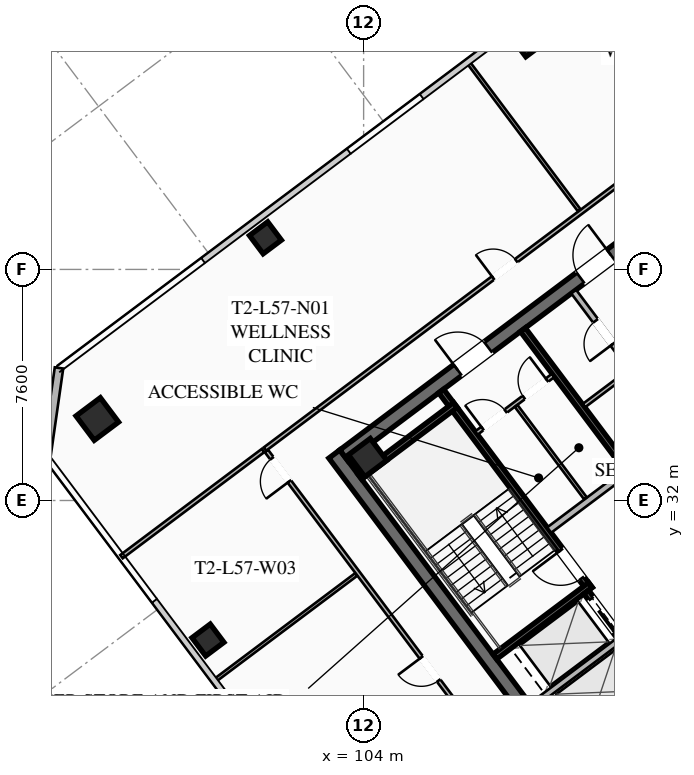
"""IFC4 building model, lengths in metres.
Left out: names, types, materials, properties, quantities, classifications, styles, units other than length and angle.
Written with IfcOpenShell. Run it as: python <this file> out.ifc"""

import sys

from ifc_helpers import new_model, si_unit, direction, frame, frame_2d, origin, origin_2d, place, context, subcontext, project, spatial, rectangle, hollow_rectangle, extrude, element, fill, save


model = new_model("IFC4")
c1 = context("Model", 3, precision=1e-05, world=origin(), true_north=direction((0.0, 1.0)))
c2 = subcontext(c1, "Body", "Model", "MODEL_VIEW")
j1 = project(units=[si_unit("LENGTHUNIT", "METRE"), si_unit("PLANEANGLEUNIT", "RADIAN")], contexts=[c1])
p1 = place(None, origin())
s1 = spatial("IfcSite", under=j1, at=p1, CompositionType="ELEMENT")
p2 = place(p1, origin())
s2 = spatial("IfcBuilding", under=s1, at=p2, CompositionType="ELEMENT")
p3 = place(p2, frame((0.0, 0.0, 211.3)))
s3 = spatial("IfcBuildingStorey", under=s2, at=p3, CompositionType="ELEMENT", Elevation=211.3)
p4 = place(p3, frame((112.396, 21.047, 0.0), z_axis=(0.0, 0.0, 1.0), x_axis=(-0.600005007985, 0.799996243986, 0.0)))
e1 = element("IfcWall", 1, at=p4, inside=s3, PredefinedType="SHEAR", context=c2, shape_type="SweptSolid", body=[
    extrude(rectangle(XDim=15.6, YDim=0.45, at=frame_2d((7.8, 0.0))), origin(), (0.0, 0.0, 1.0), 3.55),
])
p5 = place(p3, frame((103.351, 33.482, 0.0), z_axis=(0.0, 0.0, 1.0), x_axis=(0.8, 0.6, 0.0)))
e2 = element("IfcWall", 2, at=p5, inside=s3, PredefinedType="SHEAR", context=c2, shape_type="SweptSolid", body=[
    extrude(rectangle(XDim=15.26, YDim=0.45, at=frame_2d((7.63, 0.0))), origin(), (0.0, 0.0, 1.0), 3.55),
])
p6 = place(p5, frame((4.68, 0.0, 0.0)))
e3 = element("IfcOpeningElement", 3, at=p6, cuts=e2, PredefinedType="OPENING", context=c2, shape_type="SweptSolid", body=[
    extrude(rectangle(XDim=1.25, YDim=2.25, at=frame_2d((0.625, 1.125))), frame((0.0, 0.235, 0.0), z_axis=(0.0, -1.0, 0.0), x_axis=(1.0, 0.0, 0.0)), (0.0, 0.0, 1.0), 0.47),
])
p7 = place(p5, frame((9.73, 0.0, 0.0)))
e4 = element("IfcOpeningElement", 4, at=p7, cuts=e2, PredefinedType="OPENING", context=c2, shape_type="SweptSolid", body=[
    extrude(rectangle(XDim=1.25, YDim=2.25, at=frame_2d((0.625, 1.125))), frame((0.0, 0.235, 0.0), z_axis=(0.0, -1.0, 0.0), x_axis=(1.0, 0.0, 0.0)), (0.0, 0.0, 1.0), 0.47),
])
p8 = place(p3, frame((104.13, 33.41, 0.0), z_axis=(0.0, 0.0, 1.0), x_axis=(0.799999996291, 0.600000004945, 0.0)))
e5 = element("IfcColumn", 5, at=p8, inside=s3, PredefinedType="COLUMN", context=c2, shape_type="SweptSolid", body=[
    extrude(hollow_rectangle(XDim=0.9, YDim=0.9, WallThickness=0.04, at=origin_2d()), origin(), (0.0, 0.0, 1.0), 3.37),
])
p9 = place(p3, frame((95.24, 34.68, 0.0), z_axis=(0.0, 0.0, 1.0), x_axis=(0.799999996291, 0.600000004945, 0.0)))
e6 = element("IfcColumn", 6, at=p9, inside=s3, PredefinedType="COLUMN", context=c2, shape_type="SweptSolid", body=[
    extrude(hollow_rectangle(XDim=1.0, YDim=1.0, WallThickness=0.04, at=origin_2d()), origin(), (0.0, 0.0, 1.0), 3.37),
])
for number, where, z_axis, x_axis in (
    (7, (109.41, 47.12, 0.0), (0.0, 0.0, 1.0), (0.8, 0.6, 0.0)),
    (8, (100.77, 40.64, 0.0), (0.0, 0.0, 1.0), (0.8, 0.6, 0.0)),
    (9, (98.88, 27.41, 0.0), (0.0, 0.0, 1.0), (0.8, 0.6, 0.0)),
):
    element("IfcColumn", number, at=place(p3, frame(where, z_axis=z_axis, x_axis=x_axis)), inside=s3, PredefinedType="COLUMN", context=c2, shape_type="SweptSolid", body=[
        extrude(hollow_rectangle(XDim=0.75, YDim=0.75, WallThickness=0.032, at=origin_2d()), origin(), (0.0, 0.0, 1.0), 3.37),
    ])
p10 = place(p3, frame((93.56, 33.42, 0.0), z_axis=(0.0, 0.0, 1.0), x_axis=(0.14138683146, 0.989954425158, 0.0)))
e10 = element("IfcWall", 10, at=p10, inside=s3, PredefinedType="SOLIDWALL", context=c2, shape_type="SweptSolid", body=[
    extrude(rectangle(XDim=2.97, YDim=0.28, at=frame_2d((1.485, 0.0))), origin(), (0.0, 0.0, 1.0), 3.37),
])
p11 = place(p3, frame((111.44, 29.08, 0.0), z_axis=(0.0, 0.0, 1.0), x_axis=(-0.59999041401, 0.800007189403, 0.0)))
e11 = element("IfcWall", 11, at=p11, inside=s3, PredefinedType="SHEAR", context=c2, shape_type="SweptSolid", body=[
    extrude(rectangle(XDim=8.15, YDim=0.2, at=frame_2d((4.075, 0.0))), origin(), (0.0, 0.0, 1.0), 3.37),
])
p12 = place(p11, frame((0.45, 0.0, 0.0)))
e12 = element("IfcOpeningElement", 12, at=p12, cuts=e11, PredefinedType="OPENING", context=c2, shape_type="SweptSolid", body=[
    extrude(rectangle(XDim=1.15, YDim=2.2, at=frame_2d((0.575, 1.1))), frame((0.0, 0.11, 0.0), z_axis=(0.0, -1.0, 0.0), x_axis=(1.0, 0.0, 0.0)), (0.0, 0.0, 1.0), 0.22),
])
for number, where, z_axis, x_axis in (
    (13, (108.316, 26.862, 0.0), (0.0, 0.0, 1.0), (0.8, 0.6, 0.0)),
    (14, (103.876, 32.782, 0.0), (0.0, 0.0, 1.0), (0.8, 0.6, 0.0)),
):
    element("IfcWall", number, at=place(p3, frame(where, z_axis=z_axis, x_axis=x_axis)), inside=s3, PredefinedType="SHEAR", context=c2, shape_type="SweptSolid", body=[
        extrude(rectangle(XDim=3.93, YDim=0.2, at=frame_2d((1.965, 0.0))), origin(), (0.0, 0.0, 1.0), 3.37),
    ])
p13 = place(p3, frame((118.058, 25.856, 0.0), z_axis=(0.0, 0.0, 1.0), x_axis=(-0.600002657301, 0.799998007018, 0.0)))
e15 = element("IfcWall", 15, at=p13, inside=s3, PredefinedType="SHEAR", context=c2, shape_type="SweptSolid", body=[
    extrude(rectangle(XDim=14.7, YDim=0.2, at=frame_2d((7.35, 0.0))), origin(), (0.0, 0.0, 1.0), 3.37),
])
p14 = place(p3, frame((110.104, 31.028, 0.0), z_axis=(0.0, 0.0, 1.0), x_axis=(0.800018601094, 0.59997519774, 0.0)))
e16 = element("IfcWall", 16, at=p14, inside=s3, PredefinedType="SOLIDWALL", context=c2, shape_type="SweptSolid", body=[
    extrude(rectangle(XDim=3.15, YDim=0.22, at=frame_2d((1.575, 0.0))), origin(), (0.0, 0.0, 1.0), 2.723),
])
p15 = place(p3, frame((115.25, 23.75, 0.0), z_axis=(0.0, 0.0, 1.0), x_axis=(-0.599994036198, 0.800004472816, 0.0)))
e17 = element("IfcWall", 17, at=p15, inside=s3, PredefinedType="SHEAR", context=c2, shape_type="SweptSolid", body=[
    extrude(rectangle(XDim=6.55, YDim=0.2, at=frame_2d((3.275, 0.0))), origin(), (0.0, 0.0, 1.0), 3.37),
])
p16 = place(p15, frame((4.975, 0.0, 0.0)))
e18 = element("IfcOpeningElement", 18, at=p16, cuts=e17, PredefinedType="OPENING", context=c2, shape_type="SweptSolid", body=[
    extrude(rectangle(XDim=1.3, YDim=2.25, at=frame_2d((0.65, 1.125))), frame((0.0, 0.11, 0.0), z_axis=(0.0, -1.0, 0.0), x_axis=(1.0, 0.0, 0.0)), (0.0, 0.0, 1.0), 0.22),
])
p17 = place(p15, frame((2.975, 0.0, 0.0)))
e19 = element("IfcOpeningElement", 19, at=p17, cuts=e17, PredefinedType="OPENING", context=c2, shape_type="SweptSolid", body=[
    extrude(rectangle(XDim=1.3, YDim=2.25, at=frame_2d((0.65, 1.125))), frame((0.0, 0.11, 0.0), z_axis=(0.0, -1.0, 0.0), x_axis=(1.0, 0.0, 0.0)), (0.0, 0.0, 1.0), 0.22),
])
p18 = place(p15, frame((0.775, 0.0, 0.0)))
e20 = element("IfcOpeningElement", 20, at=p18, cuts=e17, PredefinedType="OPENING", context=c2, shape_type="SweptSolid", body=[
    extrude(rectangle(XDim=1.3, YDim=2.25, at=frame_2d((0.65, 1.125))), frame((0.0, 0.11, 0.0), z_axis=(0.0, -1.0, 0.0), x_axis=(1.0, 0.0, 0.0)), (0.0, 0.0, 1.0), 0.22),
])
for number, where, z_axis, x_axis in (
    (21, (110.746, 23.622, 0.0), (0.0, 0.0, 1.0), (0.8, 0.6, 0.0)),
    (22, (109.528, 25.246, 0.0), (0.0, 0.0, 1.0), (0.8, 0.6, 0.0)),
):
    element("IfcWall", number, at=place(p3, frame(where, z_axis=z_axis, x_axis=x_axis)), inside=s3, PredefinedType="SOLIDWALL", context=c2, shape_type="SweptSolid", body=[
        extrude(rectangle(XDim=3.58, YDim=0.2, at=frame_2d((1.79, 0.0))), origin(), (0.0, 0.0, 1.0), 3.37),
    ])
p19 = place(p3, frame((107.71, 34.22, 0.0), z_axis=(0.0, 0.0, 1.0), x_axis=(0.799981399002, 0.60002480053, 0.0)))
e23 = element("IfcWall", 23, at=p19, inside=s3, PredefinedType="PARTITIONING", context=c2, shape_type="SweptSolid", body=[
    extrude(rectangle(XDim=3.15, YDim=0.135, at=frame_2d((1.575, 0.0))), origin(), (0.0, 0.0, 1.0), 2.723),
])
p20 = place(p19, frame((0.25, 0.0, 0.0)))
e24 = element("IfcOpeningElement", 24, at=p20, cuts=e23, PredefinedType="OPENING", context=c2, shape_type="SweptSolid", body=[
    extrude(rectangle(XDim=0.95, YDim=2.05, at=frame_2d((0.475, 1.025))), frame((0.0, 0.077, 0.0), z_axis=(0.0, -1.0, 0.0), x_axis=(1.0, 0.0, 0.0)), (0.0, 0.0, 1.0), 0.155),
])
p21 = place(p19, frame((1.95, 0.0, 0.0)))
e25 = element("IfcOpeningElement", 25, at=p21, cuts=e23, PredefinedType="OPENING", context=c2, shape_type="SweptSolid", body=[
    extrude(rectangle(XDim=0.95, YDim=2.05, at=frame_2d((0.475, 1.025))), frame((0.0, 0.077, 0.0), z_axis=(0.0, -1.0, 0.0), x_axis=(1.0, 0.0, 0.0)), (0.0, 0.0, 1.0), 0.155),
])
p22 = place(p3, frame((111.296, 32.072, 0.0), z_axis=(0.0, 0.0, 1.0), x_axis=(-0.59995887973, 0.800030838552, 0.0)))
e26 = element("IfcWall", 26, at=p22, inside=s3, PredefinedType="PARTITIONING", context=c2, shape_type="SweptSolid", body=[
    extrude(rectangle(XDim=3.8, YDim=0.11, at=frame_2d((1.9, 0.0))), origin(), (0.0, 0.0, 1.0), 2.723),
])
p23 = place(p3, frame((115.11, 33.27, 0.0), z_axis=(0.0, 0.0, 1.0), x_axis=(-0.600011160345, 0.79999162962, 0.0)))
e27 = element("IfcWall", 27, at=p23, inside=s3, PredefinedType="SOLIDWALL", context=c2, shape_type="SweptSolid", body=[
    extrude(rectangle(XDim=7.0, YDim=0.2, at=frame_2d((3.5, 0.0))), origin(), (0.0, 0.0, 1.0), 2.723),
])
p24 = place(p23, frame((0.85, 0.0, 0.0)))
e28 = element("IfcOpeningElement", 28, at=p24, cuts=e27, PredefinedType="OPENING", context=c2, shape_type="SweptSolid", body=[
    extrude(rectangle(XDim=0.95, YDim=2.05, at=frame_2d((0.475, 1.025))), frame((0.0, 0.11, 0.0), z_axis=(0.0, -1.0, 0.0), x_axis=(1.0, 0.0, 0.0)), (0.0, 0.0, 1.0), 0.22),
])
p25 = place(p23, frame((4.85, 0.0, 0.0)))
e29 = element("IfcOpeningElement", 29, at=p25, cuts=e27, PredefinedType="OPENING", context=c2, shape_type="SweptSolid", body=[
    extrude(rectangle(XDim=0.95, YDim=2.05, at=frame_2d((0.475, 1.025))), frame((0.0, 0.11, 0.0), z_axis=(0.0, -1.0, 0.0), x_axis=(1.0, 0.0, 0.0)), (0.0, 0.0, 1.0), 0.22),
])
p26 = place(p3, frame((111.246, 35.122, 0.0), z_axis=(0.0, 0.0, 1.0), x_axis=(0.8, 0.6, 0.0)))
e30 = element("IfcWall", 30, at=p26, inside=s3, PredefinedType="PARTITIONING", context=c2, shape_type="SweptSolid", body=[
    extrude(rectangle(XDim=1.88, YDim=0.135, at=frame_2d((0.94, 0.0))), origin(), (0.0, 0.0, 1.0), 2.723),
])
p27 = place(p3, frame((100.756, 33.692, 0.0), z_axis=(0.0, 0.0, 1.0), x_axis=(0.799998716732, 0.60000171102, 0.0)))
e31 = element("IfcWall", 31, at=p27, inside=s3, PredefinedType="PARTITIONING", context=c2, shape_type="SweptSolid", body=[
    extrude(rectangle(XDim=22.83, YDim=0.135, at=frame_2d((11.415, 0.0))), origin(), (0.0, 0.0, 1.0), 2.723),
])
p28 = place(p27, frame((9.38, 0.0, 0.0)))
e32 = element("IfcOpeningElement", 32, at=p28, cuts=e31, PredefinedType="OPENING", context=c2, shape_type="SweptSolid", body=[
    extrude(rectangle(XDim=0.95, YDim=2.05, at=frame_2d((0.475, 1.025))), frame((0.0, 0.077, 0.0), z_axis=(0.0, -1.0, 0.0), x_axis=(1.0, 0.0, 0.0)), (0.0, 0.0, 1.0), 0.155),
])
p29 = place(p27, frame((21.58, 0.0, 0.0)))
e33 = element("IfcOpeningElement", 33, at=p29, cuts=e31, PredefinedType="OPENING", context=c2, shape_type="SweptSolid", body=[
    extrude(rectangle(XDim=0.95, YDim=2.05, at=frame_2d((0.475, 1.025))), frame((0.0, 0.077, 0.0), z_axis=(0.0, -1.0, 0.0), x_axis=(1.0, 0.0, 0.0)), (0.0, 0.0, 1.0), 0.155),
])
p30 = place(p3, frame((111.092, 41.544, 0.0), z_axis=(0.0, 0.0, 1.0), x_axis=(-0.600006403464, 0.799995197362, 0.0)))
e34 = element("IfcWall", 34, at=p30, inside=s3, PredefinedType="PARTITIONING", context=c2, shape_type="SweptSolid", body=[
    extrude(rectangle(XDim=6.1, YDim=0.11, at=frame_2d((3.05, 0.0))), origin(), (0.0, 0.0, 1.0), 2.723),
])
p31 = place(p3, frame((113.23, 17.06, 0.0), z_axis=(0.0, 0.0, 1.0), x_axis=(-0.600003772342, 0.79999717073, 0.0)))
e35 = element("IfcWall", 35, at=p31, inside=s3, PredefinedType="PARTITIONING", context=c2, shape_type="SweptSolid", body=[
    extrude(rectangle(XDim=20.71, YDim=0.135, at=frame_2d((10.355, 0.0))), origin(), (0.0, 0.0, 1.0), 2.723),
])
p32 = place(p31, frame((0.3, 0.0, 0.0)))
e36 = element("IfcOpeningElement", 36, at=p32, cuts=e35, PredefinedType="OPENING", context=c2, shape_type="SweptSolid", body=[
    extrude(rectangle(XDim=0.95, YDim=2.05, at=frame_2d((0.475, 1.025))), frame((0.0, 0.077, 0.0), z_axis=(0.0, -1.0, 0.0), x_axis=(1.0, 0.0, 0.0)), (0.0, 0.0, 1.0), 0.155),
])
p33 = place(p31, frame((11.272, 0.0, 0.0)))
e37 = element("IfcOpeningElement", 37, at=p33, cuts=e35, PredefinedType="OPENING", context=c2, shape_type="SweptSolid", body=[
    extrude(rectangle(XDim=0.95, YDim=2.05, at=frame_2d((0.475, 1.025))), frame((0.0, 0.077, 0.0), z_axis=(0.0, -1.0, 0.0), x_axis=(1.0, 0.0, 0.0)), (0.0, 0.0, 1.0), 0.155),
])
p34 = place(p31, frame((19.46, 0.0, 0.0)))
e38 = element("IfcOpeningElement", 38, at=p34, cuts=e35, PredefinedType="OPENING", context=c2, shape_type="SweptSolid", body=[
    extrude(rectangle(XDim=0.95, YDim=2.05, at=frame_2d((0.475, 1.025))), frame((0.0, 0.077, 0.0), z_axis=(0.0, -1.0, 0.0), x_axis=(1.0, 0.0, 0.0)), (0.0, 0.0, 1.0), 0.155),
])
p35 = place(p3, frame((100.692, 33.644, 0.0), z_axis=(0.0, 0.0, 1.0), x_axis=(-0.800005033825, -0.599993288175, 0.0)))
e39 = element("IfcWall", 39, at=p35, inside=s3, PredefinedType="PARTITIONING", context=c2, shape_type="SweptSolid", body=[
    extrude(rectangle(XDim=5.82, YDim=0.135, at=frame_2d((2.91, 0.0))), origin(), (0.0, 0.0, 1.0), 2.723),
])
p36 = place(p3, frame((99.096, 26.072, 0.0), z_axis=(0.0, 0.0, 1.0), x_axis=(0.800005033825, 0.599993288175, 0.0)))
e40 = element("IfcWall", 40, at=p36, inside=s3, PredefinedType="PARTITIONING", context=c2, shape_type="SweptSolid", body=[
    extrude(rectangle(XDim=5.82, YDim=0.11, at=frame_2d((2.91, 0.0))), origin(), (0.0, 0.0, 1.0), 2.723),
])
p37 = place(p6, origin())
e41 = element("IfcDoor", 41, at=p37, inside=s3, OperationType="SINGLE_SWING_LEFT", PredefinedType="DOOR", context=c2, shape_type="SweptSolid", body=[
    extrude(rectangle(XDim=1.25, YDim=2.25, at=frame_2d((0.625, 1.125))), frame((0.0, 0.025, 0.0), z_axis=(0.0, -1.0, 0.0), x_axis=(1.0, 0.0, 0.0)), (0.0, 0.0, 1.0), 0.05),
])
fill(e3, e41)
p38 = place(p7, origin())
e42 = element("IfcDoor", 42, at=p38, inside=s3, OperationType="SINGLE_SWING_RIGHT", PredefinedType="DOOR", context=c2, shape_type="SweptSolid", body=[
    extrude(rectangle(XDim=1.25, YDim=2.25, at=frame_2d((0.625, 1.125))), frame((0.0, 0.025, 0.0), z_axis=(0.0, -1.0, 0.0), x_axis=(1.0, 0.0, 0.0)), (0.0, 0.0, 1.0), 0.05),
])
fill(e4, e42)
p39 = place(p12, origin())
e43 = element("IfcDoor", 43, at=p39, inside=s3, OperationType="SINGLE_SWING_RIGHT", PredefinedType="DOOR", context=c2, shape_type="SweptSolid", body=[
    extrude(rectangle(XDim=1.15, YDim=2.2, at=frame_2d((0.575, 1.1))), frame((0.0, 0.025, 0.0), z_axis=(0.0, -1.0, 0.0), x_axis=(1.0, 0.0, 0.0)), (0.0, 0.0, 1.0), 0.05),
])
fill(e12, e43)
p40 = place(p20, origin())
e44 = element("IfcDoor", 44, at=p40, inside=s3, OperationType="SINGLE_SWING_LEFT", PredefinedType="DOOR", context=c2, shape_type="SweptSolid", body=[
    extrude(rectangle(XDim=0.95, YDim=2.05, at=frame_2d((0.475, 1.025))), frame((0.0, 0.025, 0.0), z_axis=(0.0, -1.0, 0.0), x_axis=(1.0, 0.0, 0.0)), (0.0, 0.0, 1.0), 0.05),
])
fill(e24, e44)
p41 = place(p21, origin())
e45 = element("IfcDoor", 45, at=p41, inside=s3, OperationType="SINGLE_SWING_RIGHT", PredefinedType="DOOR", context=c2, shape_type="SweptSolid", body=[
    extrude(rectangle(XDim=0.95, YDim=2.05, at=frame_2d((0.475, 1.025))), frame((0.0, 0.025, 0.0), z_axis=(0.0, -1.0, 0.0), x_axis=(1.0, 0.0, 0.0)), (0.0, 0.0, 1.0), 0.05),
])
fill(e25, e45)
p42 = place(p25, origin())
e46 = element("IfcDoor", 46, at=p42, inside=s3, OperationType="SINGLE_SWING_LEFT", PredefinedType="DOOR", context=c2, shape_type="SweptSolid", body=[
    extrude(rectangle(XDim=0.95, YDim=2.05, at=frame_2d((0.475, 1.025))), frame((0.0, 0.025, 0.0), z_axis=(0.0, -1.0, 0.0), x_axis=(1.0, 0.0, 0.0)), (0.0, 0.0, 1.0), 0.05),
])
fill(e29, e46)
p43 = place(p28, origin())
e47 = element("IfcDoor", 47, at=p43, inside=s3, OperationType="SINGLE_SWING_LEFT", PredefinedType="DOOR", context=c2, shape_type="SweptSolid", body=[
    extrude(rectangle(XDim=0.95, YDim=2.05, at=frame_2d((0.475, 1.025))), frame((0.0, 0.025, 0.0), z_axis=(0.0, -1.0, 0.0), x_axis=(1.0, 0.0, 0.0)), (0.0, 0.0, 1.0), 0.05),
])
fill(e32, e47)
p44 = place(p33, origin())
e48 = element("IfcDoor", 48, at=p44, inside=s3, OperationType="SINGLE_SWING_RIGHT", PredefinedType="DOOR", context=c2, shape_type="SweptSolid", body=[
    extrude(rectangle(XDim=0.95, YDim=2.05, at=frame_2d((0.475, 1.025))), frame((0.0, 0.025, 0.0), z_axis=(0.0, -1.0, 0.0), x_axis=(1.0, 0.0, 0.0)), (0.0, 0.0, 1.0), 0.05),
])
fill(e37, e48)
p45 = place(p34, origin())
e49 = element("IfcDoor", 49, at=p45, inside=s3, OperationType="SINGLE_SWING_LEFT", PredefinedType="DOOR", context=c2, shape_type="SweptSolid", body=[
    extrude(rectangle(XDim=0.95, YDim=2.05, at=frame_2d((0.475, 1.025))), frame((0.0, 0.025, 0.0), z_axis=(0.0, -1.0, 0.0), x_axis=(1.0, 0.0, 0.0)), (0.0, 0.0, 1.0), 0.05),
])
fill(e38, e49)
p46 = place(p16, origin())
e50 = element("IfcDoor", 50, at=p46, inside=s3, OperationType="SLIDING_TO_LEFT", PredefinedType="DOOR", context=c2, shape_type="SweptSolid", body=[
    extrude(rectangle(XDim=1.3, YDim=2.25, at=frame_2d((0.65, 1.125))), frame((0.0, 0.025, 0.0), z_axis=(0.0, -1.0, 0.0), x_axis=(1.0, 0.0, 0.0)), (0.0, 0.0, 1.0), 0.05),
])
fill(e18, e50)
save(model, sys.argv[1])
